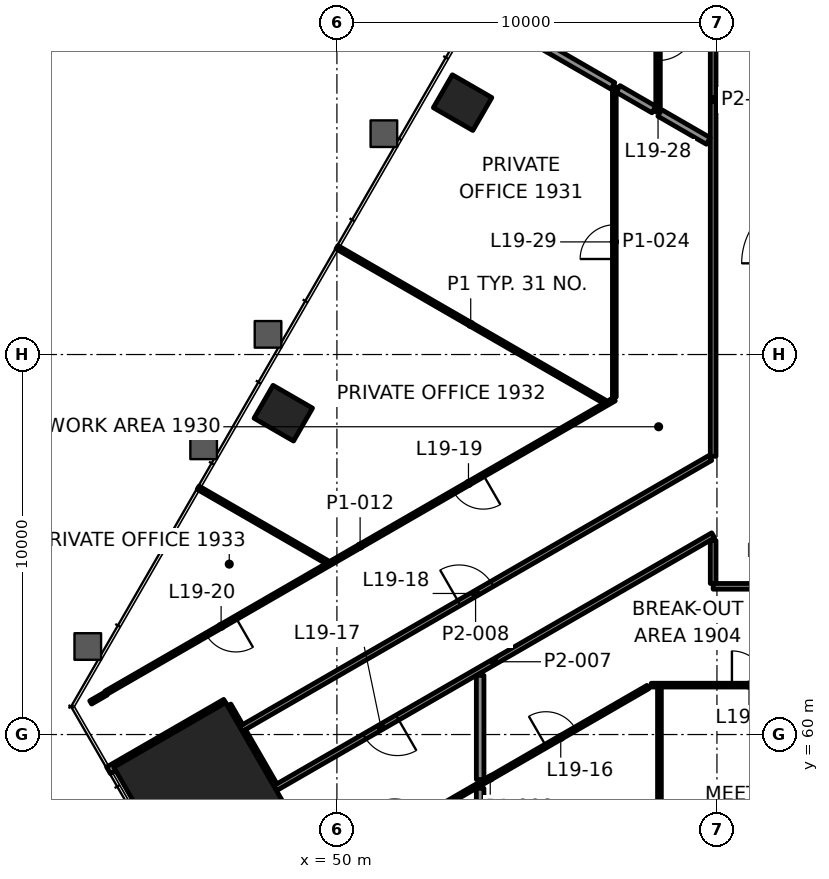
"""IFC4 building model, lengths in metres.
Left out: names, types, materials, properties, quantities, classifications, styles, units other than length and angle.
Written with IfcOpenShell. Run it as: python <this file> out.ifc"""

import sys

from ifc_helpers import new_model, si_unit, direction, frame, frame_2d, origin, origin_2d, place, context, subcontext, project, spatial, rectangle, extrude, element, fill, save


model = new_model("IFC4")
c1 = context("Model", 3, precision=1e-05, world=origin(), true_north=direction((0.0, 1.0)))
c2 = subcontext(c1, "Body", "Model", "MODEL_VIEW")
j1 = project(units=[si_unit("LENGTHUNIT", "METRE"), si_unit("PLANEANGLEUNIT", "RADIAN")], contexts=[c1])
p1 = place(None, origin())
s1 = spatial("IfcSite", under=j1, at=p1, CompositionType="ELEMENT")
p2 = place(p1, origin())
s2 = spatial("IfcBuilding", under=s1, at=p2, CompositionType="ELEMENT")
p3 = place(p2, frame((0.0, 0.0, 86.2)))
s3 = spatial("IfcBuildingStorey", under=s2, at=p3, CompositionType="ELEMENT", Elevation=86.2)
p4 = place(p3, frame((46.45, 58.517, 0.0), z_axis=(0.0, 0.0, 1.0), x_axis=(0.5, -0.866025403784, 0.0)))
e1 = element("IfcColumn", 1, at=p4, inside=s3, PredefinedType="COLUMN", context=c2, shape_type="SweptSolid", body=[
    extrude(rectangle(XDim=3.4, YDim=3.4, at=origin_2d()), origin(), (0.0, 0.0, 1.0), 4.2),
])
for number, where, z_axis, x_axis in (
    (2, (53.307, 76.628, -0.0), (0.0, 0.0, 1.0), (-0.5, -0.866, 0.0)),
    (3, (48.589, 68.457, -0.0), (0.0, 0.0, 1.0), (-0.5, -0.866, 0.0)),
):
    element("IfcColumn", number, at=place(p3, frame(where, z_axis=z_axis, x_axis=x_axis)), inside=s3, PredefinedType="COLUMN", context=c2, shape_type="SweptSolid", body=[
        extrude(rectangle(XDim=1.0, YDim=1.2, at=origin_2d()), origin(), (0.0, 0.0, 1.0), 4.2),
    ])
p5 = place(p3, frame((58.271, 61.3, 0.0), z_axis=(0.0, 0.0, 1.0), x_axis=(1.0, 0.0, 0.0)))
e4 = element("IfcWall", 4, at=p5, inside=s3, PredefinedType="PARTITIONING", context=c2, shape_type="SweptSolid", body=[
    extrude(rectangle(XDim=14.37, YDim=0.1, at=frame_2d((7.185, 0.0))), origin(), (0.0, 0.0, 1.0), 3.4),
])
p6 = place(p5, frame((2.123, 0.0, 0.0)))
e5 = element("IfcOpeningElement", 5, at=p6, cuts=e4, PredefinedType="OPENING", context=c2, shape_type="SweptSolid", body=[
    extrude(rectangle(XDim=0.9, YDim=2.1, at=frame_2d((0.45, 1.05))), frame((0.0, 0.06, 0.0), z_axis=(0.0, -1.0, 0.0), x_axis=(1.0, 0.0, 0.0)), (0.0, 0.0, 1.0), 0.12),
])
p7 = place(p5, frame((9.052, 0.0, 0.0)))
e6 = element("IfcOpeningElement", 6, at=p7, cuts=e4, PredefinedType="OPENING", context=c2, shape_type="SweptSolid", body=[
    extrude(rectangle(XDim=1.0, YDim=2.1, at=frame_2d((0.5, 1.05))), frame((0.0, 0.06, 0.0), z_axis=(0.0, -1.0, 0.0), x_axis=(1.0, 0.0, 0.0)), (0.0, 0.0, 1.0), 0.12),
])
p8 = place(p3, frame((90.1, 63.9, 0.0), z_axis=(0.0, 0.0, 1.0), x_axis=(-1.0, 0.0, 0.0)))
e7 = element("IfcWall", 7, at=p8, inside=s3, PredefinedType="PARTITIONING", context=c2, shape_type="SweptSolid", body=[
    extrude(rectangle(XDim=30.2, YDim=0.15, at=frame_2d((15.1, 0.0))), origin(), (0.0, 0.0, 1.0), 3.4),
])
p9 = place(p8, frame((4.792, 0.0, 0.0)))
e8 = element("IfcOpeningElement", 8, at=p9, cuts=e7, PredefinedType="OPENING", context=c2, shape_type="SweptSolid", body=[
    extrude(rectangle(XDim=1.0, YDim=2.1, at=frame_2d((0.5, 1.05))), frame((0.0, 0.085, 0.0), z_axis=(0.0, -1.0, 0.0), x_axis=(1.0, 0.0, 0.0)), (0.0, 0.0, 1.0), 0.17),
])
p10 = place(p8, frame((11.111, 0.0, 0.0)))
e9 = element("IfcOpeningElement", 9, at=p10, cuts=e7, PredefinedType="OPENING", context=c2, shape_type="SweptSolid", body=[
    extrude(rectangle(XDim=0.9, YDim=2.1, at=frame_2d((0.45, 1.05))), frame((0.0, 0.085, 0.0), z_axis=(0.0, -1.0, 0.0), x_axis=(1.0, 0.0, 0.0)), (0.0, 0.0, 1.0), 0.17),
])
p11 = place(p8, frame((13.47, 0.0, 0.0)))
e10 = element("IfcOpeningElement", 10, at=p11, cuts=e7, PredefinedType="OPENING", context=c2, shape_type="SweptSolid", body=[
    extrude(rectangle(XDim=0.9, YDim=2.1, at=frame_2d((0.45, 1.05))), frame((0.0, 0.085, 0.0), z_axis=(0.0, -1.0, 0.0), x_axis=(1.0, 0.0, 0.0)), (0.0, 0.0, 1.0), 0.17),
])
p12 = place(p8, frame((15.83, 0.0, 0.0)))
e11 = element("IfcOpeningElement", 11, at=p12, cuts=e7, PredefinedType="OPENING", context=c2, shape_type="SweptSolid", body=[
    extrude(rectangle(XDim=0.9, YDim=2.1, at=frame_2d((0.45, 1.05))), frame((0.0, 0.085, 0.0), z_axis=(0.0, -1.0, 0.0), x_axis=(1.0, 0.0, 0.0)), (0.0, 0.0, 1.0), 0.17),
])
p13 = place(p8, frame((21.677, 0.0, 0.0)))
e12 = element("IfcOpeningElement", 12, at=p13, cuts=e7, PredefinedType="OPENING", context=c2, shape_type="SweptSolid", body=[
    extrude(rectangle(XDim=1.0, YDim=2.1, at=frame_2d((0.5, 1.05))), frame((0.0, 0.085, 0.0), z_axis=(0.0, -1.0, 0.0), x_axis=(1.0, 0.0, 0.0)), (0.0, 0.0, 1.0), 0.17),
])
p14 = place(p8, frame((27.946, 0.0, 0.0)))
e13 = element("IfcOpeningElement", 13, at=p14, cuts=e7, PredefinedType="OPENING", context=c2, shape_type="SweptSolid", body=[
    extrude(rectangle(XDim=1.0, YDim=2.1, at=frame_2d((0.5, 1.05))), frame((0.0, 0.085, 0.0), z_axis=(0.0, -1.0, 0.0), x_axis=(1.0, 0.0, 0.0)), (0.0, 0.0, 1.0), 0.17),
])
p15 = place(p3, frame((49.885, 56.458, 0.0), z_axis=(0.0, 0.0, 1.0), x_axis=(0.866030313286, 0.499991496398, 0.0)))
e14 = element("IfcWall", 14, at=p15, inside=s3, PredefinedType="PARTITIONING", context=c2, shape_type="SweptSolid", body=[
    extrude(rectangle(XDim=9.583, YDim=0.1, at=frame_2d((4.792, 0.0))), origin(), (0.0, 0.0, 1.0), 3.4),
])
p16 = place(p15, frame((1.892, 0.0, 0.0)))
e15 = element("IfcOpeningElement", 15, at=p16, cuts=e14, PredefinedType="OPENING", context=c2, shape_type="SweptSolid", body=[
    extrude(rectangle(XDim=0.9, YDim=2.1, at=frame_2d((0.45, 1.05))), frame((0.0, 0.06, 0.0), z_axis=(0.0, -1.0, 0.0), x_axis=(1.0, 0.0, 0.0)), (0.0, 0.0, 1.0), 0.12),
])
p17 = place(p15, frame((6.484, 0.0, 0.0)))
e16 = element("IfcOpeningElement", 16, at=p17, cuts=e14, PredefinedType="OPENING", context=c2, shape_type="SweptSolid", body=[
    extrude(rectangle(XDim=0.9, YDim=2.1, at=frame_2d((0.45, 1.05))), frame((0.0, 0.06, 0.0), z_axis=(0.0, -1.0, 0.0), x_axis=(1.0, 0.0, 0.0)), (0.0, 0.0, 1.0), 0.12),
])
p18 = place(p3, frame((59.9, 65.243, 0.0), z_axis=(0.0, 0.0, 1.0), x_axis=(-0.866025527764, -0.499999785261, 0.0)))
e17 = element("IfcWall", 17, at=p18, inside=s3, PredefinedType="PARTITIONING", context=c2, shape_type="SweptSolid", body=[
    extrude(rectangle(XDim=13.31, YDim=0.15, at=frame_2d((6.655, 0.0))), origin(), (0.0, 0.0, 1.0), 3.247),
])
p19 = place(p18, frame((9.594, 0.0, 0.0)))
e18 = element("IfcOpeningElement", 18, at=p19, cuts=e17, PredefinedType="OPENING", context=c2, shape_type="SweptSolid", body=[
    extrude(rectangle(XDim=1.0, YDim=2.1, at=frame_2d((0.5, 1.05))), frame((0.0, 0.085, 0.0), z_axis=(0.0, -1.0, 0.0), x_axis=(1.0, 0.0, 0.0)), (0.0, 0.0, 1.0), 0.17),
])
p20 = place(p3, frame((47.473, 60.146, 0.0), z_axis=(0.0, 0.0, 1.0), x_axis=(0.866025677055, 0.499999526681, 0.0)))
e19 = element("IfcWall", 19, at=p20, inside=s3, PredefinedType="PARTITIONING", context=c2, shape_type="SweptSolid", body=[
    extrude(rectangle(XDim=14.263, YDim=0.15, at=frame_2d((7.132, 0.0))), origin(), (0.0, 0.0, 1.0), 3.4),
])
p21 = place(p20, frame((6.632, 0.0, 0.0)))
e20 = element("IfcOpeningElement", 20, at=p21, cuts=e19, PredefinedType="OPENING", context=c2, shape_type="SweptSolid", body=[
    extrude(rectangle(XDim=1.0, YDim=2.1, at=frame_2d((0.5, 1.05))), frame((0.0, 0.085, 0.0), z_axis=(0.0, -1.0, 0.0), x_axis=(1.0, 0.0, 0.0)), (0.0, 0.0, 1.0), 0.17),
])
p22 = place(p3, frame((43.99, 59.058, 0.0), z_axis=(0.0, 0.0, 1.0), x_axis=(0.866031398331, 0.499989616998, 0.0)))
e21 = element("IfcWall", 21, at=p22, inside=s3, PredefinedType="PARTITIONING", context=c2, shape_type="SweptSolid", body=[
    extrude(rectangle(XDim=3.56, YDim=0.2, at=frame_2d((1.78, 0.0))), origin(), (0.0, 0.0, 1.0), 3.4),
])
p23 = place(p3, frame((43.521, 60.845, 0.0), z_axis=(0.0, 0.0, 1.0), x_axis=(0.865979310119, 0.500079828073, 0.0)))
e22 = element("IfcWall", 22, at=p23, inside=s3, PredefinedType="PARTITIONING", context=c2, shape_type="SweptSolid", body=[
    extrude(rectangle(XDim=0.473, YDim=0.1, at=frame_2d((0.237, 0.0))), origin(), (0.0, 0.0, 1.0), 3.4),
])
p24 = place(p3, frame((57.3, 68.823, 0.0), z_axis=(0.0, 0.0, 1.0), x_axis=(-0.866026891502, -0.499997423189, 0.0)))
e23 = element("IfcWall", 23, at=p24, inside=s3, PredefinedType="PARTITIONING", context=c2, shape_type="SweptSolid", body=[
    extrude(rectangle(XDim=15.448, YDim=0.1, at=frame_2d((7.724, 0.0))), origin(), (0.0, 0.0, 1.0), 3.4),
])
p25 = place(p24, frame((3.982, 0.0, 0.0)))
e24 = element("IfcOpeningElement", 24, at=p25, cuts=e23, PredefinedType="OPENING", context=c2, shape_type="SweptSolid", body=[
    extrude(rectangle(XDim=0.9, YDim=2.1, at=frame_2d((0.45, 1.05))), frame((0.0, 0.06, 0.0), z_axis=(0.0, -1.0, 0.0), x_axis=(1.0, 0.0, 0.0)), (0.0, 0.0, 1.0), 0.12),
])
p26 = place(p24, frame((11.498, 0.0, 0.0)))
e25 = element("IfcOpeningElement", 25, at=p26, cuts=e23, PredefinedType="OPENING", context=c2, shape_type="SweptSolid", body=[
    extrude(rectangle(XDim=0.9, YDim=2.1, at=frame_2d((0.45, 1.05))), frame((0.0, 0.06, 0.0), z_axis=(0.0, -1.0, 0.0), x_axis=(1.0, 0.0, 0.0)), (0.0, 0.0, 1.0), 0.12),
])
p27 = place(p3, frame((59.9, 63.975, 0.0), z_axis=(0.0, 0.0, 1.0), x_axis=(0.0, 1.0, 0.0)))
e26 = element("IfcWall", 26, at=p27, inside=s3, PredefinedType="PARTITIONING", context=c2, shape_type="SweptSolid", body=[
    extrude(rectangle(XDim=1.131, YDim=0.15, at=frame_2d((0.565, 0.0))), origin(), (0.0, 0.0, 1.0), 3.247),
])
p28 = place(p3, frame((59.9, 67.321, 0.0), z_axis=(0.0, 0.0, 1.0), x_axis=(0.0, 1.0, 0.0)))
e27 = element("IfcWall", 27, at=p28, inside=s3, PredefinedType="PARTITIONING", context=c2, shape_type="SweptSolid", body=[
    extrude(rectangle(XDim=18.776, YDim=0.15, at=frame_2d((9.388, 0.0))), origin(), (0.0, 0.0, 1.0), 3.4),
])
p29 = place(p28, frame((11.711, 0.0, 0.0)))
e28 = element("IfcOpeningElement", 28, at=p29, cuts=e27, PredefinedType="OPENING", context=c2, shape_type="SweptSolid", body=[
    extrude(rectangle(XDim=1.2, YDim=2.1, at=frame_2d((0.6, 1.05))), frame((0.0, 0.085, 0.0), z_axis=(0.0, -1.0, 0.0), x_axis=(1.0, 0.0, 0.0)), (0.0, 0.0, 1.0), 0.17),
])
p30 = place(p3, frame((58.487, 54.439, 0.0), z_axis=(0.0, 0.0, 1.0), x_axis=(0.0, 1.0, 0.0)))
e29 = element("IfcWall", 29, at=p30, inside=s3, PredefinedType="PARTITIONING", context=c2, shape_type="SweptSolid", body=[
    extrude(rectangle(XDim=6.811, YDim=0.1, at=frame_2d((3.405, 0.0))), origin(), (0.0, 0.0, 1.0), 3.165),
])
p31 = place(p3, frame((58.45, 84.336, 0.0), z_axis=(0.0, 0.0, 1.0), x_axis=(0.0, -1.0, 0.0)))
e30 = element("IfcWall", 30, at=p31, inside=s3, PredefinedType="PARTITIONING", context=c2, shape_type="SweptSolid", body=[
    extrude(rectangle(XDim=7.953, YDim=0.12, at=frame_2d((3.976, 0.0))), origin(), (0.0, 0.0, 1.0), 3.4),
])
p32 = place(p31, frame((0.709, 0.0, 0.0)))
e31 = element("IfcOpeningElement", 31, at=p32, cuts=e30, PredefinedType="OPENING", context=c2, shape_type="SweptSolid", body=[
    extrude(rectangle(XDim=0.9, YDim=2.1, at=frame_2d((0.45, 1.05))), frame((0.0, 0.07, 0.0), z_axis=(0.0, -1.0, 0.0), x_axis=(1.0, 0.0, 0.0)), (0.0, 0.0, 1.0), 0.14),
])
p33 = place(p31, frame((2.833, 0.0, 0.0)))
e32 = element("IfcOpeningElement", 32, at=p33, cuts=e30, PredefinedType="OPENING", context=c2, shape_type="SweptSolid", body=[
    extrude(rectangle(XDim=0.9, YDim=2.1, at=frame_2d((0.45, 1.05))), frame((0.0, 0.07, 0.0), z_axis=(0.0, -1.0, 0.0), x_axis=(1.0, 0.0, 0.0)), (0.0, 0.0, 1.0), 0.14),
])
p34 = place(p31, frame((5.6, 0.0, 0.0)))
e33 = element("IfcOpeningElement", 33, at=p34, cuts=e30, PredefinedType="OPENING", context=c2, shape_type="SweptSolid", body=[
    extrude(rectangle(XDim=1.0, YDim=2.1, at=frame_2d((0.5, 1.05))), frame((0.0, 0.07, 0.0), z_axis=(0.0, -1.0, 0.0), x_axis=(1.0, 0.0, 0.0)), (0.0, 0.0, 1.0), 0.14),
])
p35 = place(p3, frame((57.3, 68.88, 0.0), z_axis=(0.0, 0.0, 1.0), x_axis=(0.0, 1.0, 0.0)))
e34 = element("IfcWall", 34, at=p35, inside=s3, PredefinedType="PARTITIONING", context=c2, shape_type="SweptSolid", body=[
    extrude(rectangle(XDim=8.167, YDim=0.1, at=frame_2d((4.083, 0.0))), origin(), (0.0, 0.0, 1.0), 3.4),
])
p36 = place(p35, frame((3.634, 0.0, 0.0)))
e35 = element("IfcOpeningElement", 35, at=p36, cuts=e34, PredefinedType="OPENING", context=c2, shape_type="SweptSolid", body=[
    extrude(rectangle(XDim=0.9, YDim=2.1, at=frame_2d((0.45, 1.05))), frame((0.0, 0.06, 0.0), z_axis=(0.0, -1.0, 0.0), x_axis=(1.0, 0.0, 0.0)), (0.0, 0.0, 1.0), 0.12),
])
p37 = place(p3, frame((53.769, 54.439, 0.0), z_axis=(0.0, 0.0, 1.0), x_axis=(0.0, 1.0, 0.0)))
e36 = element("IfcWall", 36, at=p37, inside=s3, PredefinedType="PARTITIONING", context=c2, shape_type="SweptSolid", body=[
    extrude(rectangle(XDim=4.146, YDim=0.2, at=frame_2d((2.073, 0.0))), origin(), (0.0, 0.0, 1.0), 3.4),
])
p38 = place(p3, frame((48.335, 58.653, 0.0), z_axis=(0.0, 0.0, 1.0), x_axis=(-0.499991515992, 0.866030301974, 0.0)))
e37 = element("IfcWall", 37, at=p38, inside=s3, PredefinedType="PARTITIONING", context=c2, shape_type="SweptSolid", body=[
    extrude(rectangle(XDim=1.649, YDim=0.2, at=frame_2d((0.825, 0.0))), origin(), (0.0, 0.0, 1.0), 3.247),
])
p39 = place(p3, frame((59.773, 75.62, 0.0), z_axis=(0.0, 0.0, 1.0), x_axis=(-0.866056109487, 0.499946812391, 0.0)))
e38 = element("IfcWall", 38, at=p39, inside=s3, PredefinedType="PARTITIONING", context=c2, shape_type="SweptSolid", body=[
    extrude(rectangle(XDim=1.476, YDim=0.2, at=frame_2d((0.738, 0.0))), origin(), (0.0, 0.0, 1.0), 3.4),
])
p40 = place(p3, frame((57.04, 68.76, 0.0), z_axis=(0.0, 0.0, 1.0), x_axis=(-0.866036506983, 0.499980768202, 0.0)))
e39 = element("IfcWall", 39, at=p40, inside=s3, PredefinedType="PARTITIONING", context=c2, shape_type="SweptSolid", body=[
    extrude(rectangle(XDim=8.127, YDim=0.1, at=frame_2d((4.063, 0.0))), origin(), (0.0, 0.0, 1.0), 3.165),
])
p41 = place(p3, frame((49.732, 64.541, 0.0), z_axis=(0.0, 0.0, 1.0), x_axis=(-0.866020177134, 0.500009052715, 0.0)))
e40 = element("IfcWall", 40, at=p41, inside=s3, PredefinedType="PARTITIONING", context=c2, shape_type="SweptSolid", body=[
    extrude(rectangle(XDim=3.908, YDim=0.1, at=frame_2d((1.954, 0.0))), origin(), (0.0, 0.0, 1.0), 3.4),
])
p42 = place(p3, frame((53.769, 58.816, 0.0), z_axis=(0.0, 0.0, 1.0), x_axis=(0.0, 1.0, 0.0)))
e41 = element("IfcWall", 41, at=p42, inside=s3, PredefinedType="PARTITIONING", context=c2, shape_type="SweptSolid", body=[
    extrude(rectangle(XDim=2.74, YDim=0.2, at=frame_2d((1.37, 0.0))), origin(), (0.0, 0.0, 1.0), 3.4),
])
p43 = place(p3, frame((47.435, 60.211, 0.0), z_axis=(0.0, 0.0, 1.0), x_axis=(-0.499801510763, 0.866139971275, 0.0)))
e42 = element("IfcWall", 42, at=p43, inside=s3, PredefinedType="PARTITIONING", context=c2, shape_type="SweptSolid", body=[
    extrude(rectangle(XDim=0.624, YDim=0.2, at=frame_2d((0.312, 0.0))), origin(), (0.0, 0.0, 1.0), 3.4),
])
p44 = place(p3, frame((58.34, 76.447, 0.0), z_axis=(0.0, 0.0, 1.0), x_axis=(-0.866062005839, 0.499936598022, 0.0)))
e43 = element("IfcWall", 43, at=p44, inside=s3, PredefinedType="PARTITIONING", context=c2, shape_type="SweptSolid", body=[
    extrude(rectangle(XDim=1.086, YDim=0.2, at=frame_2d((0.543, 0.0))), origin(), (0.0, 0.0, 1.0), 3.4),
])
p45 = place(p3, frame((57.263, 77.069, 0.0), z_axis=(0.0, 0.0, 1.0), x_axis=(-0.866048944448, 0.499959224157, 0.0)))
e44 = element("IfcWall", 44, at=p45, inside=s3, PredefinedType="PARTITIONING", context=c2, shape_type="SweptSolid", body=[
    extrude(rectangle(XDim=4.165, YDim=0.2, at=frame_2d((2.083, 0.0))), origin(), (0.0, 0.0, 1.0), 3.165),
])
p46 = place(p6, origin())
e45 = element("IfcDoor", 45, at=p46, inside=s3, OperationType="SINGLE_SWING_LEFT", PredefinedType="DOOR", context=c2, shape_type="SweptSolid", body=[
    extrude(rectangle(XDim=0.9, YDim=2.1, at=frame_2d((0.45, 1.05))), frame((0.0, 0.025, 0.0), z_axis=(0.0, -1.0, 0.0), x_axis=(1.0, 0.0, 0.0)), (0.0, 0.0, 1.0), 0.05),
])
fill(e5, e45)
p47 = place(p17, origin())
e46 = element("IfcDoor", 46, at=p47, inside=s3, OperationType="SINGLE_SWING_RIGHT", PredefinedType="DOOR", context=c2, shape_type="SweptSolid", body=[
    extrude(rectangle(XDim=0.9, YDim=2.1, at=frame_2d((0.45, 1.05))), frame((0.0, 0.025, 0.0), z_axis=(0.0, -1.0, 0.0), x_axis=(1.0, 0.0, 0.0)), (0.0, 0.0, 1.0), 0.05),
])
fill(e16, e46)
p48 = place(p19, origin())
e47 = element("IfcDoor", 47, at=p48, inside=s3, OperationType="SINGLE_SWING_RIGHT", PredefinedType="DOOR", context=c2, shape_type="SweptSolid", body=[
    extrude(rectangle(XDim=1.0, YDim=2.1, at=frame_2d((0.5, 1.05))), frame((0.0, 0.025, 0.0), z_axis=(0.0, -1.0, 0.0), x_axis=(1.0, 0.0, 0.0)), (0.0, 0.0, 1.0), 0.05),
])
fill(e18, e47)
p49 = place(p21, origin())
e48 = element("IfcDoor", 48, at=p49, inside=s3, OperationType="SINGLE_SWING_LEFT", PredefinedType="DOOR", context=c2, shape_type="SweptSolid", body=[
    extrude(rectangle(XDim=1.0, YDim=2.1, at=frame_2d((0.5, 1.05))), frame((0.0, 0.025, 0.0), z_axis=(0.0, -1.0, 0.0), x_axis=(1.0, 0.0, 0.0)), (0.0, 0.0, 1.0), 0.05),
])
fill(e20, e48)
p50 = place(p25, origin())
e49 = element("IfcDoor", 49, at=p50, inside=s3, OperationType="SINGLE_SWING_RIGHT", PredefinedType="DOOR", context=c2, shape_type="SweptSolid", body=[
    extrude(rectangle(XDim=0.9, YDim=2.1, at=frame_2d((0.45, 1.05))), frame((0.0, 0.025, 0.0), z_axis=(0.0, -1.0, 0.0), x_axis=(1.0, 0.0, 0.0)), (0.0, 0.0, 1.0), 0.05),
])
fill(e24, e49)
p51 = place(p26, origin())
e50 = element("IfcDoor", 50, at=p51, inside=s3, OperationType="SINGLE_SWING_LEFT", PredefinedType="DOOR", context=c2, shape_type="SweptSolid", body=[
    extrude(rectangle(XDim=0.9, YDim=2.1, at=frame_2d((0.45, 1.05))), frame((0.0, 0.025, 0.0), z_axis=(0.0, -1.0, 0.0), x_axis=(1.0, 0.0, 0.0)), (0.0, 0.0, 1.0), 0.05),
])
fill(e25, e50)
p52 = place(p34, origin())
e51 = element("IfcDoor", 51, at=p52, inside=s3, OperationType="SINGLE_SWING_LEFT", PredefinedType="DOOR", context=c2, shape_type="SweptSolid", body=[
    extrude(rectangle(XDim=1.0, YDim=2.1, at=frame_2d((0.5, 1.05))), frame((0.0, 0.025, 0.0), z_axis=(0.0, -1.0, 0.0), x_axis=(1.0, 0.0, 0.0)), (0.0, 0.0, 1.0), 0.05),
])
fill(e33, e51)
p53 = place(p36, origin())
e52 = element("IfcDoor", 52, at=p53, inside=s3, OperationType="SINGLE_SWING_RIGHT", PredefinedType="DOOR", context=c2, shape_type="SweptSolid", body=[
    extrude(rectangle(XDim=0.9, YDim=2.1, at=frame_2d((0.45, 1.05))), frame((0.0, 0.025, 0.0), z_axis=(0.0, -1.0, 0.0), x_axis=(1.0, 0.0, 0.0)), (0.0, 0.0, 1.0), 0.05),
])
fill(e35, e52)
save(model, sys.argv[1])
